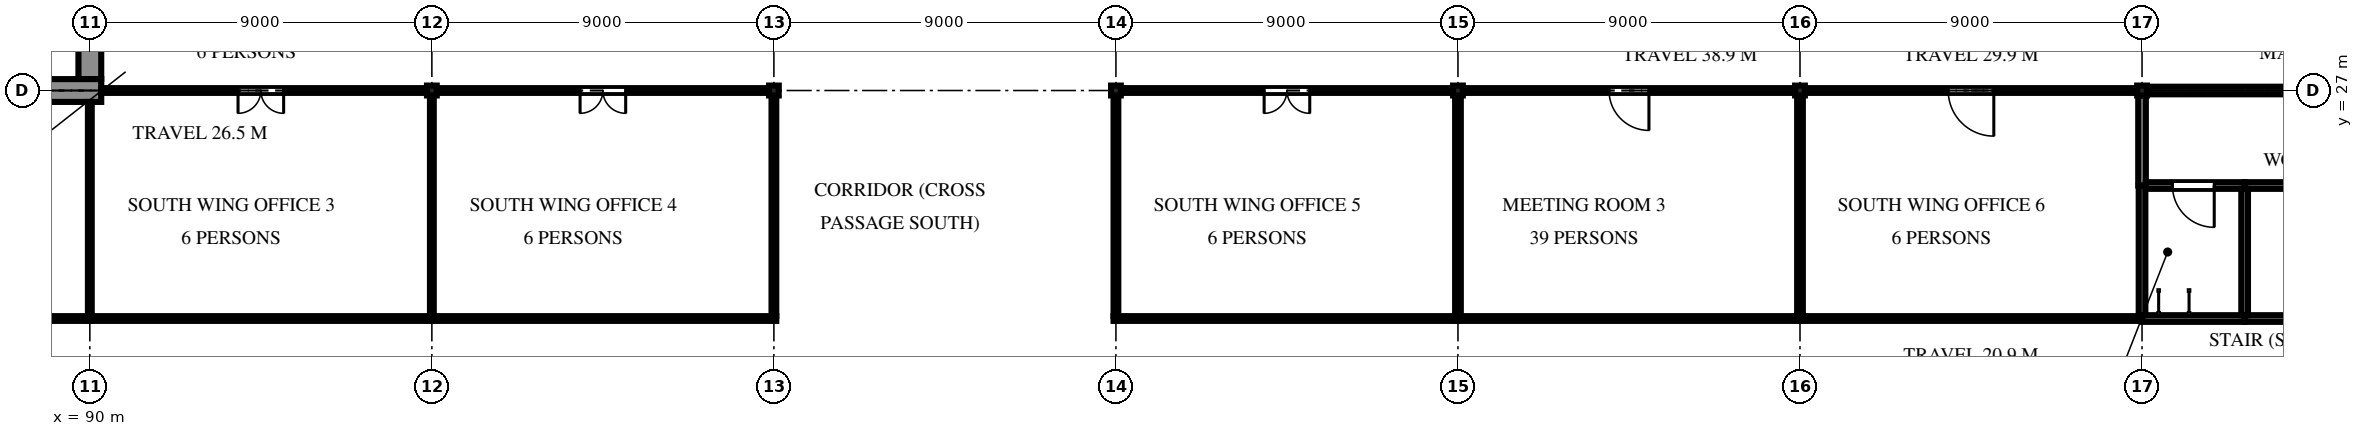
"""IFC4 building model, lengths in metres.
Left out: names, types, materials, properties, quantities, classifications, styles, units other than length and angle.
Written with IfcOpenShell. Run it as: python <this file> out.ifc"""

import sys

from ifc_helpers import new_model, si_unit, direction, frame, frame_2d, origin, origin_2d, place, context, subcontext, project, spatial, polyline, rectangle, i_section, outline, extrude, element, fill, save


model = new_model("IFC4")
c1 = context("Model", 3, precision=1e-05, world=origin(), true_north=direction((0.0, 1.0)))
c2 = subcontext(c1, "Body", "Model", "MODEL_VIEW")
j1 = project(units=[si_unit("LENGTHUNIT", "METRE"), si_unit("PLANEANGLEUNIT", "RADIAN")], contexts=[c1])
p1 = place(None, origin())
s1 = spatial("IfcSite", under=j1, at=p1, CompositionType="ELEMENT")
p2 = place(p1, origin())
s2 = spatial("IfcBuilding", under=s1, at=p2, CompositionType="ELEMENT")
p3 = place(p2, frame((0.0, 0.0, 7.5)))
s3 = spatial("IfcBuildingStorey", under=s2, at=p3, CompositionType="ELEMENT", Elevation=7.5)
for number, where, z_axis, x_axis in (
    (1, (99.0, 27.0, 0.0), (0.0, 0.0, 1.0), (1.0, 0.0, 0.0)),
    (2, (108.0, 27.0, 0.0), (0.0, 0.0, 1.0), (1.0, 0.0, 0.0)),
    (3, (117.0, 27.0, 0.0), (0.0, 0.0, 1.0), (1.0, 0.0, 0.0)),
    (4, (126.0, 27.0, 0.0), (0.0, 0.0, 1.0), (1.0, 0.0, 0.0)),
    (5, (135.0, 27.0, 0.0), (0.0, 0.0, 1.0), (1.0, 0.0, 0.0)),
    (6, (144.0, 27.0, 0.0), (0.0, 0.0, 1.0), (1.0, 0.0, 0.0)),
):
    element("IfcColumn", number, at=place(p3, frame(where, z_axis=z_axis, x_axis=x_axis)), inside=s3, PredefinedType="COLUMN", context=c2, shape_type="SweptSolid", body=[
        extrude(i_section(OverallWidth=0.256, OverallDepth=0.26, WebThickness=0.01, FlangeThickness=0.017, FilletRadius=0.013, at=origin_2d()), origin(), (0.0, 0.0, 1.0), 4.2),
    ])
p4 = place(p3, frame((71.7, 27.0, 0.0), z_axis=(0.0, 0.0, 1.0), x_axis=(1.0, 0.0, 0.0)))
e7 = element("IfcWall", 7, at=p4, inside=s3, PredefinedType="SOLIDWALL", context=c2, shape_type="SweptSolid", body=[
    extrude(rectangle(XDim=18.6, YDim=0.6, at=frame_2d((9.3, 0.0))), origin(), (0.0, 0.0, 1.0), 4.2),
])
p5 = place(p3, frame((90.0, 27.3, 0.0), z_axis=(0.0, 0.0, 1.0), x_axis=(0.0, 1.0, 0.0)))
e8 = element("IfcWall", 8, at=p5, inside=s3, PredefinedType="SOLIDWALL", context=c2, shape_type="SweptSolid", body=[
    extrude(rectangle(XDim=8.4, YDim=0.6, at=frame_2d((4.2, 0.0))), origin(), (0.0, 0.0, 1.0), 4.2),
])
p6 = place(p5, frame((3.8, 0.0, 0.0)))
e9 = element("IfcOpeningElement", 9, at=p6, cuts=e8, PredefinedType="OPENING", context=c2, shape_type="SweptSolid", body=[
    extrude(rectangle(XDim=1.8, YDim=2.1, at=frame_2d((0.9, 1.05))), frame((0.0, 0.31, 0.0), z_axis=(0.0, -1.0, 0.0), x_axis=(1.0, 0.0, 0.0)), (0.0, 0.0, 1.0), 0.62),
])
p7 = place(p5, frame((6.95, 0.0, 0.0)))
e10 = element("IfcOpeningElement", 10, at=p7, cuts=e8, PredefinedType="OPENING", context=c2, shape_type="SweptSolid", body=[
    extrude(rectangle(XDim=0.9, YDim=2.1, at=frame_2d((0.45, 1.05))), frame((0.0, 0.31, 0.0), z_axis=(0.0, -1.0, 0.0), x_axis=(1.0, 0.0, 0.0)), (0.0, 0.0, 1.0), 0.62),
])
p8 = place(p3, frame((144.0, 21.0, 0.0), z_axis=(0.0, 0.0, 1.0), x_axis=(1.0, 0.0, 0.0)))
e11 = element("IfcWall", 11, at=p8, inside=s3, PredefinedType="PARTITIONING", context=c2, shape_type="SweptSolid", body=[
    extrude(rectangle(XDim=2.7, YDim=0.175, at=frame_2d((1.35, 0.0))), origin(), (0.0, 0.0, 1.0), 3.307),
])
for number, where, z_axis, x_axis in (
    (12, (135.0, 21.0, 0.0), (0.0, 0.0, 1.0), (1.0, 0.0, 0.0)),
    (13, (90.0, 21.0, 0.0), (0.0, 0.0, 1.0), (1.0, 0.0, 0.0)),
    (14, (126.0, 21.0, 0.0), (0.0, 0.0, 1.0), (1.0, 0.0, 0.0)),
):
    element("IfcWall", number, at=place(p3, frame(where, z_axis=z_axis, x_axis=x_axis)), inside=s3, PredefinedType="PARTITIONING", context=c2, shape_type="SweptSolid", body=[
        extrude(rectangle(XDim=9.0, YDim=0.125, at=frame_2d((4.5, 0.0))), origin(), (0.0, 0.0, 1.0), 3.307),
    ])
for number, where, z_axis, x_axis in (
    (15, (99.0, 21.0, 0.0), (0.0, 0.0, 1.0), (1.0, 0.0, 0.0)),
    (16, (116.938, 21.0, 0.0), (0.0, 0.0, 1.0), (1.0, 0.0, 0.0)),
):
    element("IfcWall", number, at=place(p3, frame(where, z_axis=z_axis, x_axis=x_axis)), inside=s3, PredefinedType="PARTITIONING", context=c2, shape_type="SweptSolid", body=[
        extrude(rectangle(XDim=9.062, YDim=0.125, at=frame_2d((4.531, 0.0))), origin(), (0.0, 0.0, 1.0), 3.307),
    ])
p9 = place(p3, frame((146.7, 21.0, 0.0), z_axis=(0.0, 0.0, 1.0), x_axis=(1.0, 0.0, 0.0)))
e17 = element("IfcWall", 17, at=p9, inside=s3, PredefinedType="PARTITIONING", context=c2, shape_type="SweptSolid", body=[
    extrude(rectangle(XDim=3.15, YDim=0.175, at=frame_2d((1.575, 0.0))), origin(), (0.0, 0.0, 1.0), 3.307),
])
p10 = place(p3, frame((81.0, 21.0, 0.0), z_axis=(0.0, 0.0, 1.0), x_axis=(1.0, 0.0, 0.0)))
e18 = element("IfcWall", 18, at=p10, inside=s3, PredefinedType="PARTITIONING", context=c2, shape_type="SweptSolid", body=[
    extrude(rectangle(XDim=9.0, YDim=0.125, at=frame_2d((4.5, 0.0))), origin(), (0.0, 0.0, 1.0), 3.307),
])
p11 = place(p10, frame((4.0, 0.0, 0.0)))
e19 = element("IfcOpeningElement", 19, at=p11, cuts=e18, PredefinedType="OPENING", context=c2, shape_type="SweptSolid", body=[
    extrude(rectangle(XDim=1.0, YDim=2.1, at=frame_2d((0.5, 1.05))), frame((0.0, 0.073, 0.0), z_axis=(0.0, -1.0, 0.0), x_axis=(1.0, 0.0, 0.0)), (0.0, 0.0, 1.0), 0.145),
])
p12 = place(p3, frame((143.872, 27.0, 0.0), z_axis=(0.0, 0.0, 1.0), x_axis=(-1.0, 0.0, 0.0)))
e20 = element("IfcWall", 20, at=p12, inside=s3, PredefinedType="PARTITIONING", context=c2, shape_type="SweptSolid", body=[
    extrude(rectangle(XDim=8.744, YDim=0.125, at=frame_2d((4.372, 0.0))), origin(), (0.0, 0.0, 1.0), 3.307),
])
p13 = place(p12, frame((3.772, 0.0, 0.0)))
e21 = element("IfcOpeningElement", 21, at=p13, cuts=e20, PredefinedType="OPENING", context=c2, shape_type="SweptSolid", body=[
    extrude(rectangle(XDim=1.2, YDim=2.1, at=frame_2d((0.6, 1.05))), frame((0.0, 0.073, 0.0), z_axis=(0.0, -1.0, 0.0), x_axis=(1.0, 0.0, 0.0)), (0.0, 0.0, 1.0), 0.145),
])
p14 = place(p3, frame((98.872, 27.0, 0.0), z_axis=(0.0, 0.0, 1.0), x_axis=(-1.0, 0.0, 0.0)))
e22 = element("IfcWall", 22, at=p14, inside=s3, PredefinedType="PARTITIONING", context=c2, shape_type="SweptSolid", body=[
    extrude(rectangle(XDim=8.57, YDim=0.125, at=frame_2d((4.285, 0.0))), origin(), (0.0, 0.0, 1.0), 3.307),
])
p15 = place(p14, frame((3.772, 0.0, 0.0)))
e23 = element("IfcOpeningElement", 23, at=p15, cuts=e22, PredefinedType="OPENING", context=c2, shape_type="SweptSolid", body=[
    extrude(rectangle(XDim=1.2, YDim=2.1, at=frame_2d((0.6, 1.05))), frame((0.0, 0.073, 0.0), z_axis=(0.0, -1.0, 0.0), x_axis=(1.0, 0.0, 0.0)), (0.0, 0.0, 1.0), 0.145),
])
p16 = place(p3, frame((134.872, 27.0, 0.0), z_axis=(0.0, 0.0, 1.0), x_axis=(-1.0, 0.0, 0.0)))
e24 = element("IfcWall", 24, at=p16, inside=s3, PredefinedType="PARTITIONING", context=c2, shape_type="SweptSolid", body=[
    extrude(rectangle(XDim=8.744, YDim=0.125, at=frame_2d((4.372, 0.0))), origin(), (0.0, 0.0, 1.0), 3.307),
])
p17 = place(p16, frame((3.847, 0.0, 0.0)))
e25 = element("IfcOpeningElement", 25, at=p17, cuts=e24, PredefinedType="OPENING", context=c2, shape_type="SweptSolid", body=[
    extrude(rectangle(XDim=1.05, YDim=2.1, at=frame_2d((0.525, 1.05))), frame((0.0, 0.073, 0.0), z_axis=(0.0, -1.0, 0.0), x_axis=(1.0, 0.0, 0.0)), (0.0, 0.0, 1.0), 0.145),
])
p18 = place(p3, frame((107.872, 27.0, 0.0), z_axis=(0.0, 0.0, 1.0), x_axis=(-1.0, 0.0, 0.0)))
e26 = element("IfcWall", 26, at=p18, inside=s3, PredefinedType="PARTITIONING", context=c2, shape_type="SweptSolid", body=[
    extrude(rectangle(XDim=8.744, YDim=0.125, at=frame_2d((4.372, 0.0))), origin(), (0.0, 0.0, 1.0), 3.307),
])
p19 = place(p18, frame((3.772, 0.0, 0.0)))
e27 = element("IfcOpeningElement", 27, at=p19, cuts=e26, PredefinedType="OPENING", context=c2, shape_type="SweptSolid", body=[
    extrude(rectangle(XDim=1.2, YDim=2.1, at=frame_2d((0.6, 1.05))), frame((0.0, 0.073, 0.0), z_axis=(0.0, -1.0, 0.0), x_axis=(1.0, 0.0, 0.0)), (0.0, 0.0, 1.0), 0.145),
])
p20 = place(p3, frame((125.872, 27.0, 0.0), z_axis=(0.0, 0.0, 1.0), x_axis=(-1.0, 0.0, 0.0)))
e28 = element("IfcWall", 28, at=p20, inside=s3, PredefinedType="PARTITIONING", context=c2, shape_type="SweptSolid", body=[
    extrude(rectangle(XDim=8.744, YDim=0.125, at=frame_2d((4.372, 0.0))), origin(), (0.0, 0.0, 1.0), 3.307),
])
p21 = place(p20, frame((3.772, 0.0, 0.0)))
e29 = element("IfcOpeningElement", 29, at=p21, cuts=e28, PredefinedType="OPENING", context=c2, shape_type="SweptSolid", body=[
    extrude(rectangle(XDim=1.2, YDim=2.1, at=frame_2d((0.6, 1.05))), frame((0.0, 0.073, 0.0), z_axis=(0.0, -1.0, 0.0), x_axis=(1.0, 0.0, 0.0)), (0.0, 0.0, 1.0), 0.145),
])
p22 = place(p3, frame((152.872, 27.0, 0.0), z_axis=(0.0, 0.0, 1.0), x_axis=(-1.0, 0.0, 0.0)))
e30 = element("IfcWall", 30, at=p22, inside=s3, PredefinedType="PARTITIONING", context=c2, shape_type="SweptSolid", body=[
    extrude(rectangle(XDim=8.744, YDim=0.2, at=frame_2d((4.372, 0.0))), origin(), (0.0, 0.0, 1.0), 3.382),
])
p23 = place(p22, frame((3.772, 0.0, 0.0)))
e31 = element("IfcOpeningElement", 31, at=p23, cuts=e30, PredefinedType="OPENING", context=c2, shape_type="SweptSolid", body=[
    extrude(rectangle(XDim=1.2, YDim=2.1, at=frame_2d((0.6, 1.05))), frame((0.0, 0.11, 0.0), z_axis=(0.0, -1.0, 0.0), x_axis=(1.0, 0.0, 0.0)), (0.0, 0.0, 1.0), 0.22),
])
for number, where, z_axis, x_axis in (
    (32, (108.0, 21.062, 0.0), (0.0, 0.0, 1.0), (0.0, 1.0, 0.0)),
    (33, (117.0, 26.87, 0.0), (0.0, 0.0, 1.0), (0.0, -1.0, 0.0)),
):
    element("IfcWall", number, at=place(p3, frame(where, z_axis=z_axis, x_axis=x_axis)), inside=s3, PredefinedType="PARTITIONING", context=c2, shape_type="SweptSolid", body=[
        extrude(rectangle(XDim=5.807, YDim=0.125, at=frame_2d((2.904, 0.0))), origin(), (0.0, 0.0, 1.0), 3.307),
    ])
p24 = place(p3, frame((90.0, 26.698, 0.0), z_axis=(0.0, 0.0, 1.0), x_axis=(0.0, -1.0, 0.0)))
e34 = element("IfcWall", 34, at=p24, inside=s3, PredefinedType="PARTITIONING", context=c2, shape_type="SweptSolid", body=[
    extrude(rectangle(XDim=5.635, YDim=0.1, at=frame_2d((2.818, 0.0))), origin(), (0.0, 0.0, 1.0), 3.643),
])
p25 = place(p3, frame((99.0, 26.87, 0.0), z_axis=(0.0, 0.0, 1.0), x_axis=(0.0, -1.0, 0.0)))
e35 = element("IfcWall", 35, at=p25, inside=s3, PredefinedType="PARTITIONING", context=c2, shape_type="SweptSolid", body=[
    extrude(rectangle(XDim=5.807, YDim=0.1, at=frame_2d((2.904, 0.0))), origin(), (0.0, 0.0, 1.0), 3.643),
])
for number, where, z_axis, x_axis in (
    (36, (126.0, 26.87, 0.0), (0.0, 0.0, 1.0), (0.0, -1.0, 0.0)),
    (37, (135.0, 26.87, 0.0), (0.0, 0.0, 1.0), (0.0, -1.0, 0.0)),
):
    element("IfcWall", number, at=place(p3, frame(where, z_axis=z_axis, x_axis=x_axis)), inside=s3, PredefinedType="PARTITIONING", context=c2, shape_type="SweptSolid", body=[
        extrude(rectangle(XDim=5.807, YDim=0.15, at=frame_2d((2.904, 0.0))), origin(), (0.0, 0.0, 1.0), 3.307),
    ])
p26 = place(p3, frame((144.0, 24.5, 0.0), z_axis=(0.0, 0.0, 1.0), x_axis=(0.0, -1.0, 0.0)))
e38 = element("IfcWall", 38, at=p26, inside=s3, PredefinedType="PARTITIONING", context=c2, shape_type="SweptSolid", body=[
    extrude(rectangle(XDim=3.413, YDim=0.175, at=frame_2d((1.706, 0.0))), origin(), (0.0, 0.0, 1.0), 3.307),
])
p27 = place(p3, frame((144.0, 26.87, 0.0), z_axis=(0.0, 0.0, 1.0), x_axis=(0.0, -1.0, 0.0)))
e39 = element("IfcWall", 39, at=p27, inside=s3, PredefinedType="PARTITIONING", context=c2, shape_type="SweptSolid", body=[
    extrude(rectangle(XDim=2.37, YDim=0.2, at=frame_2d((1.185, 0.0))), origin(), (0.0, 0.0, 1.0), 3.382),
])
p28 = place(p3, frame((146.7, 24.5, 0.0), z_axis=(0.0, 0.0, 1.0), x_axis=(-1.0, 0.0, 0.0)))
e40 = element("IfcWall", 40, at=p28, inside=s3, PredefinedType="PARTITIONING", context=c2, shape_type="SweptSolid", body=[
    extrude(rectangle(XDim=2.6, YDim=0.175, at=frame_2d((1.3, 0.0))), origin(), (0.0, 0.0, 1.0), 3.307),
])
p29 = place(p28, frame((0.8, 0.0, 0.0)))
e41 = element("IfcOpeningElement", 41, at=p29, cuts=e40, PredefinedType="OPENING", context=c2, shape_type="SweptSolid", body=[
    extrude(rectangle(XDim=1.1, YDim=2.1, at=frame_2d((0.55, 1.05))), frame((0.0, 0.097, 0.0), z_axis=(0.0, -1.0, 0.0), x_axis=(1.0, 0.0, 0.0)), (0.0, 0.0, 1.0), 0.195),
])
p30 = place(p3, frame((149.85, 24.5, 0.0), z_axis=(0.0, 0.0, 1.0), x_axis=(-1.0, 0.0, 0.0)))
e42 = element("IfcWall", 42, at=p30, inside=s3, PredefinedType="PARTITIONING", context=c2, shape_type="SweptSolid", body=[
    extrude(rectangle(XDim=3.15, YDim=0.175, at=frame_2d((1.575, 0.0))), origin(), (0.0, 0.0, 1.0), 3.307),
])
p31 = place(p30, frame((1.125, 0.0, 0.0)))
e43 = element("IfcOpeningElement", 43, at=p31, cuts=e42, PredefinedType="OPENING", context=c2, shape_type="SweptSolid", body=[
    extrude(rectangle(XDim=0.9, YDim=2.1, at=frame_2d((0.45, 1.05))), frame((0.0, 0.097, 0.0), z_axis=(0.0, -1.0, 0.0), x_axis=(1.0, 0.0, 0.0)), (0.0, 0.0, 1.0), 0.195),
])
p32 = place(p3, frame((146.7, 24.413, 0.0), z_axis=(0.0, 0.0, 1.0), x_axis=(0.0, -1.0, 0.0)))
e44 = element("IfcWall", 44, at=p32, inside=s3, PredefinedType="PARTITIONING", context=c2, shape_type="SweptSolid", body=[
    extrude(rectangle(XDim=3.325, YDim=0.175, at=frame_2d((1.663, 0.0))), origin(), (0.0, 0.0, 1.0), 3.307),
])
p33 = place(p15, origin())
e45 = element("IfcDoor", 45, at=p33, inside=s3, OperationType="DOUBLE_DOOR_SINGLE_SWING", PredefinedType="DOOR", context=c2, shape_type="SweptSolid", body=[
    extrude(outline(polyline([(0.0, 0.0), (0.07, 0.0), (0.07, 2.03), (1.13, 2.03), (1.13, 0.0), (1.2, 0.0), (1.2, 2.1), (0.0, 2.1), (0.0, 0.0)])), frame((0.0, 0.025, 0.0), z_axis=(0.0, -1.0, 0.0), x_axis=(1.0, 0.0, 0.0)), (0.0, 0.0, 1.0), 0.05),
    extrude(outline(polyline([(0.074, 0.01), (0.597, 0.01), (0.597, 2.026), (0.074, 2.026), (0.074, 0.01)]), holes=[polyline([(0.178, 0.373), (0.492, 0.373), (0.492, 1.784), (0.178, 1.784), (0.178, 0.373)])]), frame((0.0, 0.017, 0.0), z_axis=(0.0, -1.0, 0.0), x_axis=(1.0, 0.0, 0.0)), (0.0, 0.0, 1.0), 0.035),
    extrude(rectangle(XDim=0.314, YDim=1.411, at=frame_2d((0.335, 1.079))), frame((0.0, 0.009, 0.0), z_axis=(0.0, -1.0, 0.0), x_axis=(1.0, 0.0, 0.0)), (0.0, 0.0, 1.0), 0.017),
    extrude(outline(polyline([(0.603, 0.01), (1.126, 0.01), (1.126, 2.026), (0.603, 2.026), (0.603, 0.01)]), holes=[polyline([(0.708, 0.373), (1.021, 0.373), (1.021, 1.784), (0.708, 1.784), (0.708, 0.373)])]), frame((0.0, 0.017, 0.0), z_axis=(0.0, -1.0, 0.0), x_axis=(1.0, 0.0, 0.0)), (0.0, 0.0, 1.0), 0.035),
    extrude(rectangle(XDim=0.314, YDim=1.411, at=frame_2d((0.865, 1.079))), frame((0.0, 0.009, 0.0), z_axis=(0.0, -1.0, 0.0), x_axis=(1.0, 0.0, 0.0)), (0.0, 0.0, 1.0), 0.017),
])
fill(e23, e45)
p34 = place(p19, origin())
e46 = element("IfcDoor", 46, at=p34, inside=s3, OperationType="DOUBLE_DOOR_SINGLE_SWING", PredefinedType="DOOR", context=c2, shape_type="SweptSolid", body=[
    extrude(outline(polyline([(0.0, 0.0), (0.07, 0.0), (0.07, 2.03), (1.13, 2.03), (1.13, 0.0), (1.2, 0.0), (1.2, 2.1), (0.0, 2.1), (0.0, 0.0)])), frame((0.0, 0.025, 0.0), z_axis=(0.0, -1.0, 0.0), x_axis=(1.0, 0.0, 0.0)), (0.0, 0.0, 1.0), 0.05),
    extrude(outline(polyline([(0.074, 0.01), (0.597, 0.01), (0.597, 2.026), (0.074, 2.026), (0.074, 0.01)]), holes=[polyline([(0.178, 0.373), (0.492, 0.373), (0.492, 1.784), (0.178, 1.784), (0.178, 0.373)])]), frame((0.0, 0.017, 0.0), z_axis=(0.0, -1.0, 0.0), x_axis=(1.0, 0.0, 0.0)), (0.0, 0.0, 1.0), 0.035),
    extrude(rectangle(XDim=0.314, YDim=1.411, at=frame_2d((0.335, 1.079))), frame((0.0, 0.009, 0.0), z_axis=(0.0, -1.0, 0.0), x_axis=(1.0, 0.0, 0.0)), (0.0, 0.0, 1.0), 0.017),
    extrude(outline(polyline([(0.603, 0.01), (1.126, 0.01), (1.126, 2.026), (0.603, 2.026), (0.603, 0.01)]), holes=[polyline([(0.708, 0.373), (1.021, 0.373), (1.021, 1.784), (0.708, 1.784), (0.708, 0.373)])]), frame((0.0, 0.017, 0.0), z_axis=(0.0, -1.0, 0.0), x_axis=(1.0, 0.0, 0.0)), (0.0, 0.0, 1.0), 0.035),
    extrude(rectangle(XDim=0.314, YDim=1.411, at=frame_2d((0.865, 1.079))), frame((0.0, 0.009, 0.0), z_axis=(0.0, -1.0, 0.0), x_axis=(1.0, 0.0, 0.0)), (0.0, 0.0, 1.0), 0.017),
])
fill(e27, e46)
p35 = place(p21, origin())
e47 = element("IfcDoor", 47, at=p35, inside=s3, OperationType="DOUBLE_DOOR_SINGLE_SWING", PredefinedType="DOOR", context=c2, shape_type="SweptSolid", body=[
    extrude(outline(polyline([(0.0, 0.0), (0.07, 0.0), (0.07, 2.03), (1.13, 2.03), (1.13, 0.0), (1.2, 0.0), (1.2, 2.1), (0.0, 2.1), (0.0, 0.0)])), frame((0.0, 0.025, 0.0), z_axis=(0.0, -1.0, 0.0), x_axis=(1.0, 0.0, 0.0)), (0.0, 0.0, 1.0), 0.05),
    extrude(outline(polyline([(0.074, 0.01), (0.597, 0.01), (0.597, 2.026), (0.074, 2.026), (0.074, 0.01)]), holes=[polyline([(0.178, 0.373), (0.492, 0.373), (0.492, 1.784), (0.178, 1.784), (0.178, 0.373)])]), frame((0.0, 0.017, 0.0), z_axis=(0.0, -1.0, 0.0), x_axis=(1.0, 0.0, 0.0)), (0.0, 0.0, 1.0), 0.035),
    extrude(rectangle(XDim=0.314, YDim=1.411, at=frame_2d((0.335, 1.079))), frame((0.0, 0.009, 0.0), z_axis=(0.0, -1.0, 0.0), x_axis=(1.0, 0.0, 0.0)), (0.0, 0.0, 1.0), 0.017),
    extrude(outline(polyline([(0.603, 0.01), (1.126, 0.01), (1.126, 2.026), (0.603, 2.026), (0.603, 0.01)]), holes=[polyline([(0.708, 0.373), (1.021, 0.373), (1.021, 1.784), (0.708, 1.784), (0.708, 0.373)])]), frame((0.0, 0.017, 0.0), z_axis=(0.0, -1.0, 0.0), x_axis=(1.0, 0.0, 0.0)), (0.0, 0.0, 1.0), 0.035),
    extrude(rectangle(XDim=0.314, YDim=1.411, at=frame_2d((0.865, 1.079))), frame((0.0, 0.009, 0.0), z_axis=(0.0, -1.0, 0.0), x_axis=(1.0, 0.0, 0.0)), (0.0, 0.0, 1.0), 0.017),
])
fill(e29, e47)
p36 = place(p17, origin())
e48 = element("IfcDoor", 48, at=p36, inside=s3, OperationType="SINGLE_SWING_LEFT", PredefinedType="DOOR", context=c2, shape_type="SweptSolid", body=[
    extrude(outline(polyline([(0.0, 0.0), (0.07, 0.0), (0.07, 2.03), (0.98, 2.03), (0.98, 0.0), (1.05, 0.0), (1.05, 2.1), (0.0, 2.1), (0.0, 0.0)])), frame((0.0, 0.025, 0.0), z_axis=(0.0, -1.0, 0.0), x_axis=(1.0, 0.0, 0.0)), (0.0, 0.0, 1.0), 0.05),
    extrude(outline(polyline([(0.074, 0.01), (0.976, 0.01), (0.976, 2.026), (0.074, 2.026), (0.074, 0.01)]), holes=[polyline([(0.194, 0.16), (0.856, 0.16), (0.856, 1.01), (0.194, 1.01), (0.194, 0.16)]), polyline([(0.375, 1.16), (0.675, 1.16), (0.675, 1.76), (0.375, 1.76), (0.375, 1.16)])]), frame((0.0, 0.017, 0.0), z_axis=(0.0, -1.0, 0.0), x_axis=(1.0, 0.0, 0.0)), (0.0, 0.0, 1.0), 0.035),
    extrude(rectangle(XDim=0.662, YDim=0.85, at=frame_2d((0.525, 0.585))), frame((0.0, 0.009, 0.0), z_axis=(0.0, -1.0, 0.0), x_axis=(1.0, 0.0, 0.0)), (0.0, 0.0, 1.0), 0.017),
    extrude(rectangle(XDim=0.3, YDim=0.6, at=frame_2d((0.525, 1.46))), frame((0.0, 0.006, 0.0), z_axis=(0.0, -1.0, 0.0), x_axis=(1.0, 0.0, 0.0)), (0.0, 0.0, 1.0), 0.012),
])
fill(e25, e48)
p37 = place(p13, origin())
e49 = element("IfcDoor", 49, at=p37, inside=s3, OperationType="DOUBLE_DOOR_SINGLE_SWING", PredefinedType="DOOR", context=c2, shape_type="SweptSolid", body=[
    extrude(outline(polyline([(0.0, 0.0), (0.07, 0.0), (0.07, 2.03), (1.13, 2.03), (1.13, 0.0), (1.2, 0.0), (1.2, 2.1), (0.0, 2.1), (0.0, 0.0)])), frame((0.0, 0.025, 0.0), z_axis=(0.0, -1.0, 0.0), x_axis=(1.0, 0.0, 0.0)), (0.0, 0.0, 1.0), 0.05),
    extrude(outline(polyline([(0.074, 0.01), (0.597, 0.01), (0.597, 2.026), (0.074, 2.026), (0.074, 0.01)]), holes=[polyline([(0.178, 0.373), (0.492, 0.373), (0.492, 1.784), (0.178, 1.784), (0.178, 0.373)])]), frame((0.0, 0.017, 0.0), z_axis=(0.0, -1.0, 0.0), x_axis=(1.0, 0.0, 0.0)), (0.0, 0.0, 1.0), 0.035),
    extrude(rectangle(XDim=0.314, YDim=1.411, at=frame_2d((0.335, 1.079))), frame((0.0, 0.009, 0.0), z_axis=(0.0, -1.0, 0.0), x_axis=(1.0, 0.0, 0.0)), (0.0, 0.0, 1.0), 0.017),
    extrude(outline(polyline([(0.603, 0.01), (1.126, 0.01), (1.126, 2.026), (0.603, 2.026), (0.603, 0.01)]), holes=[polyline([(0.708, 0.373), (1.021, 0.373), (1.021, 1.784), (0.708, 1.784), (0.708, 0.373)])]), frame((0.0, 0.017, 0.0), z_axis=(0.0, -1.0, 0.0), x_axis=(1.0, 0.0, 0.0)), (0.0, 0.0, 1.0), 0.035),
    extrude(rectangle(XDim=0.314, YDim=1.411, at=frame_2d((0.865, 1.079))), frame((0.0, 0.009, 0.0), z_axis=(0.0, -1.0, 0.0), x_axis=(1.0, 0.0, 0.0)), (0.0, 0.0, 1.0), 0.017),
])
fill(e21, e49)
p38 = place(p29, origin())
e50 = element("IfcDoor", 50, at=p38, inside=s3, OperationType="SINGLE_SWING_LEFT", PredefinedType="DOOR", context=c2, shape_type="SweptSolid", body=[
    extrude(outline(polyline([(0.0, 0.0), (0.07, 0.0), (0.07, 2.03), (1.03, 2.03), (1.03, 0.0), (1.1, 0.0), (1.1, 2.1), (0.0, 2.1), (0.0, 0.0)])), frame((0.0, 0.025, 0.0), z_axis=(0.0, -1.0, 0.0), x_axis=(1.0, 0.0, 0.0)), (0.0, 0.0, 1.0), 0.05),
    extrude(outline(polyline([(0.074, 0.01), (1.026, 0.01), (1.026, 2.026), (0.074, 2.026), (0.074, 0.01)]), holes=[polyline([(0.194, 0.16), (0.906, 0.16), (0.906, 1.01), (0.194, 1.01), (0.194, 0.16)]), polyline([(0.4, 1.16), (0.7, 1.16), (0.7, 1.76), (0.4, 1.76), (0.4, 1.16)])]), frame((0.0, 0.017, 0.0), z_axis=(0.0, -1.0, 0.0), x_axis=(1.0, 0.0, 0.0)), (0.0, 0.0, 1.0), 0.035),
    extrude(rectangle(XDim=0.712, YDim=0.85, at=frame_2d((0.55, 0.585))), frame((0.0, 0.009, 0.0), z_axis=(0.0, -1.0, 0.0), x_axis=(1.0, 0.0, 0.0)), (0.0, 0.0, 1.0), 0.017),
    extrude(rectangle(XDim=0.3, YDim=0.6, at=frame_2d((0.55, 1.46))), frame((0.0, 0.006, 0.0), z_axis=(0.0, -1.0, 0.0), x_axis=(1.0, 0.0, 0.0)), (0.0, 0.0, 1.0), 0.012),
])
fill(e41, e50)
save(model, sys.argv[1])
